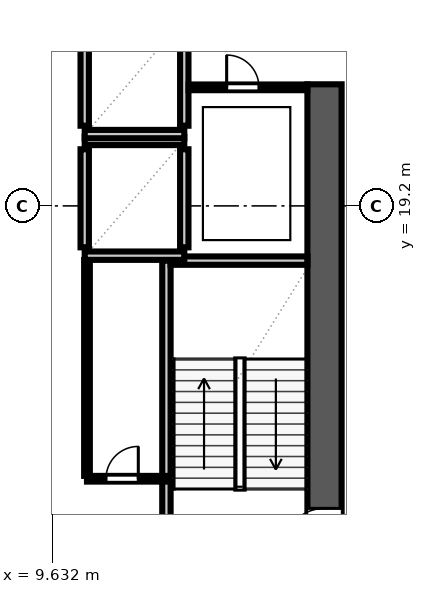
"""IFC4 building model, lengths in metres.
Left out: names, types, materials, properties, quantities, classifications, styles, units other than length and angle.
Written with IfcOpenShell. Run it as: python <this file> out.ifc"""

import sys

from ifc_helpers import new_model, si_unit, direction, frame, frame_2d, origin, place, context, subcontext, project, spatial, rectangle, extrude, element, fill, save


model = new_model("IFC4")
c1 = context("Model", 3, precision=1e-05, world=origin(), true_north=direction((0.0, 1.0)))
c2 = subcontext(c1, "Body", "Model", "MODEL_VIEW")
j1 = project(units=[si_unit("LENGTHUNIT", "METRE"), si_unit("PLANEANGLEUNIT", "RADIAN")], contexts=[c1])
p1 = place(None, origin())
s1 = spatial("IfcSite", under=j1, at=p1, CompositionType="ELEMENT")
p2 = place(p1, origin())
s2 = spatial("IfcBuilding", under=s1, at=p2, CompositionType="ELEMENT")
p3 = place(p2, frame((0.0, 0.0, 10.4)))
s3 = spatial("IfcBuildingStorey", under=s2, at=p3, CompositionType="ELEMENT", Elevation=10.4)
p4 = place(p3, frame((16.8, 10.05, 0.0), z_axis=(0.0, 0.0, 1.0), x_axis=(0.0, 1.0, 0.0)))
e1 = element("IfcWall", 1, at=p4, inside=s3, PredefinedType="SHEAR", context=c2, shape_type="SweptSolid", body=[
    extrude(rectangle(XDim=12.35, YDim=0.9, at=frame_2d((6.175, 0.0))), origin(), (0.0, 0.0, 1.0), 4.26),
])
p5 = place(p4, frame((0.09, 0.0, 0.0)))
e2 = element("IfcOpeningElement", 2, at=p5, cuts=e1, PredefinedType="OPENING", context=c2, shape_type="SweptSolid", body=[
    extrude(rectangle(XDim=1.1, YDim=2.2, at=frame_2d((0.55, 1.1))), frame((0.0, 0.462, 0.0), z_axis=(0.0, -1.0, 0.0), x_axis=(1.0, 0.0, 0.0)), (0.0, 0.0, 1.0), 0.924),
])
p6 = place(p3, frame((12.64, 10.05, 0.0), z_axis=(0.0, 0.0, 1.0), x_axis=(0.0, 1.0, 0.0)))
e3 = element("IfcWall", 3, at=p6, inside=s3, PredefinedType="SOLIDWALL", context=c2, shape_type="SweptSolid", body=[
    extrude(rectangle(XDim=7.71, YDim=0.22, at=frame_2d((3.855, 0.0))), origin(), (0.0, 0.0, 1.0), 4.26),
])
p7 = place(p3, frame((12.75, 17.76, 0.0), z_axis=(0.0, 0.0, 1.0), x_axis=(1.0, 0.0, 0.0)))
e4 = element("IfcWall", 4, at=p7, inside=s3, PredefinedType="SOLIDWALL", context=c2, shape_type="SweptSolid", body=[
    extrude(rectangle(XDim=3.6, YDim=0.22, at=frame_2d((1.8, 0.0))), origin(), (0.0, 0.0, 1.0), 4.26),
])
for number, where, z_axis, x_axis in (
    (5, (10.49, 18.11, 0.0), (0.0, 0.0, 1.0), (0.0, 1.0, 0.0)),
    (6, (13.11, 18.11, 0.0), (0.0, 0.0, 1.0), (0.0, 1.0, 0.0)),
):
    element("IfcWall", number, at=place(p3, frame(where, z_axis=z_axis, x_axis=x_axis)), inside=s3, PredefinedType="SOLIDWALL", context=c2, shape_type="SweptSolid", body=[
        extrude(rectangle(XDim=2.58, YDim=0.22, at=frame_2d((1.29, 0.0))), origin(), (0.0, 0.0, 1.0), 4.26),
    ])
for number, where, z_axis, x_axis in (
    (7, (10.49, 17.89, 0.0), (0.0, 0.0, 1.0), (1.0, 0.0, 0.0)),
    (8, (10.49, 20.91, 0.0), (0.0, 0.0, 1.0), (1.0, 0.0, 0.0)),
):
    element("IfcWall", number, at=place(p3, frame(where, z_axis=z_axis, x_axis=x_axis)), inside=s3, PredefinedType="SOLIDWALL", context=c2, shape_type="SweptSolid", body=[
        extrude(rectangle(XDim=2.62, YDim=0.22, at=frame_2d((1.31, 0.0))), origin(), (0.0, 0.0, 1.0), 4.26),
    ])
for number, where, z_axis, x_axis in (
    (9, (10.49, 21.31, 0.0), (0.0, 0.0, 1.0), (0.0, 1.0, 0.0)),
    (10, (13.11, 21.31, 0.0), (0.0, 0.0, 1.0), (0.0, 1.0, 0.0)),
):
    element("IfcWall", number, at=place(p3, frame(where, z_axis=z_axis, x_axis=x_axis)), inside=s3, PredefinedType="SOLIDWALL", context=c2, shape_type="SweptSolid", body=[
        extrude(rectangle(XDim=2.58, YDim=0.22, at=frame_2d((1.29, 0.0))), origin(), (0.0, 0.0, 1.0), 4.26),
    ])
p8 = place(p3, frame((10.49, 21.09, 0.0), z_axis=(0.0, 0.0, 1.0), x_axis=(1.0, 0.0, 0.0)))
e11 = element("IfcWall", 11, at=p8, inside=s3, PredefinedType="SOLIDWALL", context=c2, shape_type="SweptSolid", body=[
    extrude(rectangle(XDim=2.62, YDim=0.22, at=frame_2d((1.31, 0.0))), origin(), (0.0, 0.0, 1.0), 4.26),
])
p9 = place(p3, frame((10.55, 12.02, 0.0), z_axis=(0.0, 0.0, 1.0), x_axis=(1.0, 0.0, 0.0)))
e12 = element("IfcWall", 12, at=p9, inside=s3, PredefinedType="PARTITIONING", context=c2, shape_type="SweptSolid", body=[
    extrude(rectangle(XDim=2.08, YDim=0.15, at=frame_2d((1.04, 0.0))), origin(), (0.0, 0.0, 1.0), 4.26),
])
p10 = place(p9, frame((0.5, 0.0, 0.0)))
e13 = element("IfcOpeningElement", 13, at=p10, cuts=e12, PredefinedType="OPENING", context=c2, shape_type="SweptSolid", body=[
    extrude(rectangle(XDim=0.85, YDim=2.1, at=frame_2d((0.425, 1.05))), frame((0.0, 0.087, 0.0), z_axis=(0.0, -1.0, 0.0), x_axis=(1.0, 0.0, 0.0)), (0.0, 0.0, 1.0), 0.174),
])
p11 = place(p3, frame((10.55, 12.095, 0.0), z_axis=(0.0, 0.0, 1.0), x_axis=(0.0, 1.0, 0.0)))
e14 = element("IfcWall", 14, at=p11, inside=s3, PredefinedType="PARTITIONING", context=c2, shape_type="SweptSolid", body=[
    extrude(rectangle(XDim=5.68, YDim=0.15, at=frame_2d((2.84, 0.0))), origin(), (0.0, 0.0, 1.0), 4.26),
])
p12 = place(p3, frame((13.225, 22.32, 0.0), z_axis=(0.0, 0.0, 1.0), x_axis=(1.0, 0.0, 0.0)))
e15 = element("IfcWall", 15, at=p12, inside=s3, PredefinedType="PARTITIONING", context=c2, shape_type="SweptSolid", body=[
    extrude(rectangle(XDim=3.12, YDim=0.15, at=frame_2d((1.56, 0.0))), origin(), (0.0, 0.0, 1.0), 4.26),
])
p13 = place(p12, frame((1.0, 0.0, 0.0)))
e16 = element("IfcOpeningElement", 16, at=p13, cuts=e15, PredefinedType="OPENING", context=c2, shape_type="SweptSolid", body=[
    extrude(rectangle(XDim=0.85, YDim=2.1, at=frame_2d((0.425, 1.05))), frame((0.0, 0.087, 0.0), z_axis=(0.0, -1.0, 0.0), x_axis=(1.0, 0.0, 0.0)), (0.0, 0.0, 1.0), 0.174),
])
p14 = place(p5, origin())
e17 = element("IfcDoor", 17, at=p14, inside=s3, OperationType="SINGLE_SWING_LEFT", PredefinedType="DOOR", context=c2, shape_type="SweptSolid", body=[
    extrude(rectangle(XDim=1.1, YDim=2.2, at=frame_2d((0.55, 1.1))), frame((0.0, 0.025, 0.0), z_axis=(0.0, -1.0, 0.0), x_axis=(1.0, 0.0, 0.0)), (0.0, 0.0, 1.0), 0.05),
])
fill(e2, e17)
p15 = place(p10, origin())
e18 = element("IfcDoor", 18, at=p15, inside=s3, OperationType="SINGLE_SWING_RIGHT", PredefinedType="DOOR", context=c2, shape_type="SweptSolid", body=[
    extrude(rectangle(XDim=0.85, YDim=2.1, at=frame_2d((0.425, 1.05))), frame((0.0, 0.025, 0.0), z_axis=(0.0, -1.0, 0.0), x_axis=(1.0, 0.0, 0.0)), (0.0, 0.0, 1.0), 0.05),
])
fill(e13, e18)
p16 = place(p13, origin())
e19 = element("IfcDoor", 19, at=p16, inside=s3, OperationType="SINGLE_SWING_LEFT", PredefinedType="DOOR", context=c2, shape_type="SweptSolid", body=[
    extrude(rectangle(XDim=0.85, YDim=2.1, at=frame_2d((0.425, 1.05))), frame((0.0, 0.025, 0.0), z_axis=(0.0, -1.0, 0.0), x_axis=(1.0, 0.0, 0.0)), (0.0, 0.0, 1.0), 0.05),
])
fill(e16, e19)
save(model, sys.argv[1])
